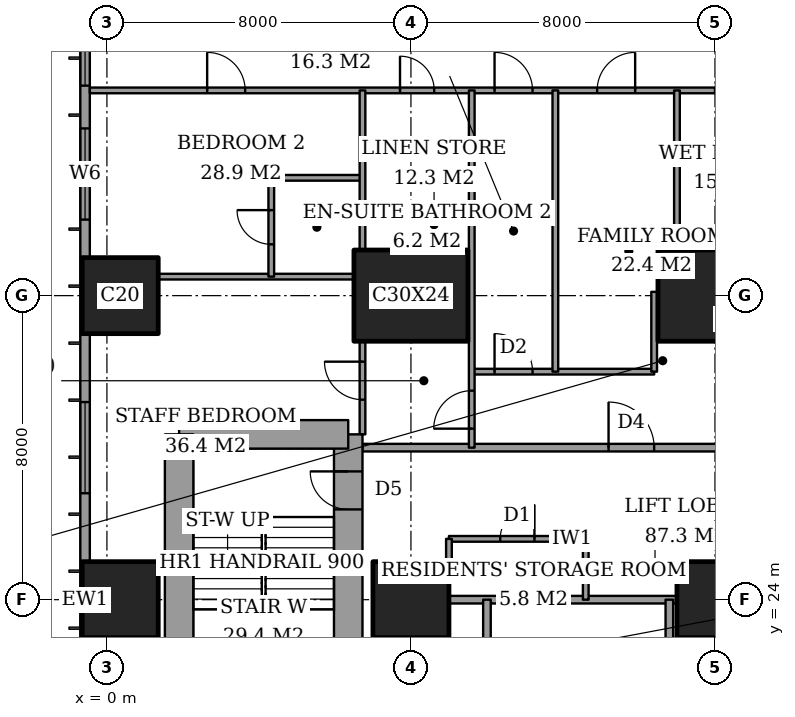
"""IFC4 building model, lengths in metres.
Left out: names, types, materials, properties, quantities, classifications, styles, units other than length and angle.
Written with IfcOpenShell. Run it as: python <this file> out.ifc"""

import sys

from ifc_helpers import new_model, si_unit, direction, frame, frame_2d, origin, origin_2d, place, context, subcontext, project, spatial, rectangle, extrude, element, fill, save


model = new_model("IFC4")
c1 = context("Model", 3, precision=1e-05, world=origin(), true_north=direction((0.0, 1.0)))
c2 = subcontext(c1, "Body", "Model", "MODEL_VIEW")
j1 = project(units=[si_unit("LENGTHUNIT", "METRE"), si_unit("PLANEANGLEUNIT", "RADIAN")], contexts=[c1])
p1 = place(None, origin())
s1 = spatial("IfcSite", under=j1, at=p1, CompositionType="ELEMENT")
p2 = place(p1, origin())
s2 = spatial("IfcBuilding", under=s1, at=p2, CompositionType="ELEMENT")
p3 = place(p2, frame((0.0, 0.0, 36.8)))
s3 = spatial("IfcBuildingStorey", under=s2, at=p3, CompositionType="ELEMENT", Elevation=36.8)
for number, where, z_axis, x_axis in (
    (1, (0.35, 24.0, 0.0), (0.0, 0.0, 1.0), (1.0, 0.0, 0.0)),
    (2, (0.35, 32.0, 0.0), (0.0, 0.0, 1.0), (1.0, 0.0, 0.0)),
    (3, (8.0, 24.0, 0.0), (0.0, 0.0, 1.0), (1.0, 0.0, 0.0)),
):
    element("IfcColumn", number, at=place(p3, frame(where, z_axis=z_axis, x_axis=x_axis)), inside=s3, PredefinedType="COLUMN", context=c2, shape_type="SweptSolid", body=[
        extrude(rectangle(XDim=2.0, YDim=2.0, at=origin_2d()), origin(), (0.0, 0.0, 1.0), 3.6),
    ])
p4 = place(p3, frame((8.0, 32.0, 0.0), z_axis=(0.0, 0.0, 1.0), x_axis=(1.0, 0.0, 0.0)))
e4 = element("IfcColumn", 4, at=p4, inside=s3, PredefinedType="COLUMN", context=c2, shape_type="SweptSolid", body=[
    extrude(rectangle(XDim=3.0, YDim=2.4, at=origin_2d()), origin(), (0.0, 0.0, 1.0), 3.6),
])
p5 = place(p3, frame((16.0, 24.0, 0.0), z_axis=(0.0, 0.0, 1.0), x_axis=(1.0, 0.0, 0.0)))
e5 = element("IfcColumn", 5, at=p5, inside=s3, PredefinedType="COLUMN", context=c2, shape_type="SweptSolid", body=[
    extrude(rectangle(XDim=2.0, YDim=2.0, at=origin_2d()), origin(), (0.0, 0.0, 1.0), 3.6),
])
p6 = place(p3, frame((16.0, 32.0, 0.0), z_axis=(0.0, 0.0, 1.0), x_axis=(1.0, 0.0, 0.0)))
e6 = element("IfcColumn", 6, at=p6, inside=s3, PredefinedType="COLUMN", context=c2, shape_type="SweptSolid", body=[
    extrude(rectangle(XDim=3.0, YDim=2.4, at=origin_2d()), origin(), (0.0, 0.0, 1.0), 3.6),
])
p7 = place(p3, frame((6.35, 19.65, 0.0), z_axis=(0.0, 0.0, 1.0), x_axis=(0.0, 1.0, 0.0)))
e7 = element("IfcWall", 7, at=p7, inside=s3, PredefinedType="SHEAR", context=c2, shape_type="SweptSolid", body=[
    extrude(rectangle(XDim=8.7, YDim=0.75, at=frame_2d((4.35, 0.0))), origin(), (0.0, 0.0, 1.0), 3.6),
])
p8 = place(p7, frame((6.725, 0.0, 0.0)))
e8 = element("IfcOpeningElement", 8, at=p8, cuts=e7, PredefinedType="OPENING", context=c2, shape_type="SweptSolid", body=[
    extrude(rectangle(XDim=1.0, YDim=2.1, at=frame_2d((0.5, 1.05))), frame((0.0, 0.385, 0.0), z_axis=(0.0, -1.0, 0.0), x_axis=(1.0, 0.0, 0.0)), (0.0, 0.0, 1.0), 0.77),
])
p9 = place(p3, frame((6.35, 28.35, 0.0), z_axis=(0.0, 0.0, 1.0), x_axis=(-1.0, 0.0, 0.0)))
e9 = element("IfcWall", 9, at=p9, inside=s3, PredefinedType="SHEAR", context=c2, shape_type="SweptSolid", body=[
    extrude(rectangle(XDim=4.45, YDim=0.75, at=frame_2d((2.225, 0.0))), origin(), (0.0, 0.0, 1.0), 3.6),
])
p10 = place(p3, frame((1.9, 28.35, 0.0), z_axis=(0.0, 0.0, 1.0), x_axis=(0.0, -1.0, 0.0)))
e10 = element("IfcWall", 10, at=p10, inside=s3, PredefinedType="SHEAR", context=c2, shape_type="SweptSolid", body=[
    extrude(rectangle(XDim=8.7, YDim=0.75, at=frame_2d((4.35, 0.0))), origin(), (0.0, 0.0, 1.0), 3.6),
])
p11 = place(p3, frame((-0.575, 44.825, 0.0), z_axis=(0.0, 0.0, 1.0), x_axis=(0.0, -1.0, 0.0)))
e11 = element("IfcWall", 11, at=p11, inside=s3, PredefinedType="SOLIDWALL", context=c2, shape_type="SweptSolid", body=[
    extrude(rectangle(XDim=41.65, YDim=0.25, at=frame_2d((20.825, 0.0))), origin(), (0.0, 0.0, 1.0), 3.6),
])
p12 = place(p11, frame((0.775, 0.0, 0.6)))
e12 = element("IfcOpeningElement", 12, at=p12, cuts=e11, PredefinedType="OPENING", context=c2, shape_type="SweptSolid", body=[
    extrude(rectangle(XDim=2.4, YDim=2.0, at=frame_2d((1.2, 1.0))), frame((0.0, 0.135, 0.0), z_axis=(0.0, -1.0, 0.0), x_axis=(1.0, 0.0, 0.0)), (0.0, 0.0, 1.0), 0.27),
])
p13 = place(p11, frame((6.1, 0.0, 0.6)))
e13 = element("IfcOpeningElement", 13, at=p13, cuts=e11, PredefinedType="OPENING", context=c2, shape_type="SweptSolid", body=[
    extrude(rectangle(XDim=1.2, YDim=2.0, at=frame_2d((0.6, 1.0))), frame((0.0, 0.135, 0.0), z_axis=(0.0, -1.0, 0.0), x_axis=(1.0, 0.0, 0.0)), (0.0, 0.0, 1.0), 0.27),
])
p14 = place(p11, frame((8.425, 0.0, 0.6)))
e14 = element("IfcOpeningElement", 14, at=p14, cuts=e11, PredefinedType="OPENING", context=c2, shape_type="SweptSolid", body=[
    extrude(rectangle(XDim=2.4, YDim=2.0, at=frame_2d((1.2, 1.0))), frame((0.0, 0.135, 0.0), z_axis=(0.0, -1.0, 0.0), x_axis=(1.0, 0.0, 0.0)), (0.0, 0.0, 1.0), 0.27),
])
p15 = place(p11, frame((15.625, 0.0, 0.6)))
e15 = element("IfcOpeningElement", 15, at=p15, cuts=e11, PredefinedType="OPENING", context=c2, shape_type="SweptSolid", body=[
    extrude(rectangle(XDim=2.4, YDim=2.0, at=frame_2d((1.2, 1.0))), frame((0.0, 0.135, 0.0), z_axis=(0.0, -1.0, 0.0), x_axis=(1.0, 0.0, 0.0)), (0.0, 0.0, 1.0), 0.27),
])
p16 = place(p11, frame((23.625, 0.0, 0.6)))
e16 = element("IfcOpeningElement", 16, at=p16, cuts=e11, PredefinedType="OPENING", context=c2, shape_type="SweptSolid", body=[
    extrude(rectangle(XDim=2.4, YDim=2.0, at=frame_2d((1.2, 1.0))), frame((0.0, 0.135, 0.0), z_axis=(0.0, -1.0, 0.0), x_axis=(1.0, 0.0, 0.0)), (0.0, 0.0, 1.0), 0.27),
])
p17 = place(p11, frame((30.825, 0.0, 0.6)))
e17 = element("IfcOpeningElement", 17, at=p17, cuts=e11, PredefinedType="OPENING", context=c2, shape_type="SweptSolid", body=[
    extrude(rectangle(XDim=2.4, YDim=2.0, at=frame_2d((1.2, 1.0))), frame((0.0, 0.135, 0.0), z_axis=(0.0, -1.0, 0.0), x_axis=(1.0, 0.0, 0.0)), (0.0, 0.0, 1.0), 0.27),
])
p18 = place(p11, frame((34.5, 0.0, 0.6)))
e18 = element("IfcOpeningElement", 18, at=p18, cuts=e11, PredefinedType="OPENING", context=c2, shape_type="SweptSolid", body=[
    extrude(rectangle(XDim=1.2, YDim=2.0, at=frame_2d((0.6, 1.0))), frame((0.0, 0.135, 0.0), z_axis=(0.0, -1.0, 0.0), x_axis=(1.0, 0.0, 0.0)), (0.0, 0.0, 1.0), 0.27),
])
p19 = place(p11, frame((38.475, 0.0, 0.6)))
e19 = element("IfcOpeningElement", 19, at=p19, cuts=e11, PredefinedType="OPENING", context=c2, shape_type="SweptSolid", body=[
    extrude(rectangle(XDim=2.4, YDim=2.0, at=frame_2d((1.2, 1.0))), frame((0.0, 0.135, 0.0), z_axis=(0.0, -1.0, 0.0), x_axis=(1.0, 0.0, 0.0)), (0.0, 0.0, 1.0), 0.27),
])
p20 = place(p3, frame((9.0, 24.0, 0.0), z_axis=(0.0, 0.0, 1.0), x_axis=(1.0, 0.0, 0.0)))
e20 = element("IfcWall", 20, at=p20, inside=s3, PredefinedType="PARTITIONING", context=c2, shape_type="SweptSolid", body=[
    extrude(rectangle(XDim=6.0, YDim=0.2, at=frame_2d((3.0, 0.0))), origin(), (0.0, 0.0, 1.0), 3.35),
])
p21 = place(p3, frame((9.0, 25.6, 0.0), z_axis=(0.0, 0.0, 1.0), x_axis=(1.0, 0.0, 0.0)))
e21 = element("IfcWall", 21, at=p21, inside=s3, PredefinedType="PARTITIONING", context=c2, shape_type="SweptSolid", body=[
    extrude(rectangle(XDim=3.6, YDim=0.15, at=frame_2d((1.8, 0.0))), origin(), (0.0, 0.0, 1.0), 3.35),
])
p22 = place(p21, frame((1.35, 0.0, 0.0)))
e22 = element("IfcOpeningElement", 22, at=p22, cuts=e21, PredefinedType="OPENING", context=c2, shape_type="SweptSolid", body=[
    extrude(rectangle(XDim=0.9, YDim=2.1, at=frame_2d((0.45, 1.05))), frame((0.0, 0.085, 0.0), z_axis=(0.0, -1.0, 0.0), x_axis=(1.0, 0.0, 0.0)), (0.0, 0.0, 1.0), 0.17),
])
p23 = place(p3, frame((6.725, 28.0, 0.0), z_axis=(0.0, 0.0, 1.0), x_axis=(1.0, 0.0, 0.0)))
e23 = element("IfcWall", 23, at=p23, inside=s3, PredefinedType="PARTITIONING", context=c2, shape_type="SweptSolid", body=[
    extrude(rectangle(XDim=17.275, YDim=0.2, at=frame_2d((8.637, 0.0))), origin(), (0.0, 0.0, 1.0), 3.35),
])
p24 = place(p23, frame((6.475, 0.0, 0.0)))
e24 = element("IfcOpeningElement", 24, at=p24, cuts=e23, PredefinedType="OPENING", context=c2, shape_type="SweptSolid", body=[
    extrude(rectangle(XDim=1.2, YDim=2.4, at=frame_2d((0.6, 1.2))), frame((0.0, 0.11, 0.0), z_axis=(0.0, -1.0, 0.0), x_axis=(1.0, 0.0, 0.0)), (0.0, 0.0, 1.0), 0.22),
])
p25 = place(p3, frame((9.6, 30.0, 0.0), z_axis=(0.0, 0.0, 1.0), x_axis=(1.0, 0.0, 0.0)))
e25 = element("IfcWall", 25, at=p25, inside=s3, PredefinedType="PARTITIONING", context=c2, shape_type="SweptSolid", body=[
    extrude(rectangle(XDim=4.8, YDim=0.15, at=frame_2d((2.4, 0.0))), origin(), (0.0, 0.0, 1.0), 3.35),
])
p26 = place(p25, frame((0.6, 0.0, 0.0)))
e26 = element("IfcOpeningElement", 26, at=p26, cuts=e25, PredefinedType="OPENING", context=c2, shape_type="SweptSolid", body=[
    extrude(rectangle(XDim=1.0, YDim=2.1, at=frame_2d((0.5, 1.05))), frame((0.0, 0.085, 0.0), z_axis=(0.0, -1.0, 0.0), x_axis=(1.0, 0.0, 0.0)), (0.0, 0.0, 1.0), 0.17),
])
p27 = place(p3, frame((1.35, 32.5, 0.0), z_axis=(0.0, 0.0, 1.0), x_axis=(1.0, 0.0, 0.0)))
e27 = element("IfcWall", 27, at=p27, inside=s3, PredefinedType="PARTITIONING", context=c2, shape_type="SweptSolid", body=[
    extrude(rectangle(XDim=5.15, YDim=0.15, at=frame_2d((2.575, 0.0))), origin(), (0.0, 0.0, 1.0), 3.35),
])
p28 = place(p3, frame((4.325, 35.1, 0.0), z_axis=(0.0, 0.0, 1.0), x_axis=(1.0, 0.0, 0.0)))
e28 = element("IfcWall", 28, at=p28, inside=s3, PredefinedType="PARTITIONING", context=c2, shape_type="SweptSolid", body=[
    extrude(rectangle(XDim=2.4, YDim=0.15, at=frame_2d((1.2, 0.0))), origin(), (0.0, 0.0, 1.0), 3.35),
])
p29 = place(p3, frame((-0.45, 37.4, 0.0), z_axis=(0.0, 0.0, 1.0), x_axis=(1.0, 0.0, 0.0)))
e29 = element("IfcWall", 29, at=p29, inside=s3, PredefinedType="PARTITIONING", context=c2, shape_type="SweptSolid", body=[
    extrude(rectangle(XDim=25.011, YDim=0.15, at=frame_2d((12.505, 0.0))), origin(), (0.0, 0.0, 1.0), 3.35),
])
p30 = place(p29, frame((10.65, 0.0, 0.0)))
e30 = element("IfcOpeningElement", 30, at=p30, cuts=e29, PredefinedType="OPENING", context=c2, shape_type="SweptSolid", body=[
    extrude(rectangle(XDim=1.0, YDim=2.1, at=frame_2d((0.5, 1.05))), frame((0.0, 0.085, 0.0), z_axis=(0.0, -1.0, 0.0), x_axis=(1.0, 0.0, 0.0)), (0.0, 0.0, 1.0), 0.17),
])
p31 = place(p29, frame((3.087, 0.0, 0.0)))
e31 = element("IfcOpeningElement", 31, at=p31, cuts=e29, PredefinedType="OPENING", context=c2, shape_type="SweptSolid", body=[
    extrude(rectangle(XDim=1.0, YDim=2.1, at=frame_2d((0.5, 1.05))), frame((0.0, 0.085, 0.0), z_axis=(0.0, -1.0, 0.0), x_axis=(1.0, 0.0, 0.0)), (0.0, 0.0, 1.0), 0.17),
])
p32 = place(p29, frame((8.163, 0.0, 0.0)))
e32 = element("IfcOpeningElement", 32, at=p32, cuts=e29, PredefinedType="OPENING", context=c2, shape_type="SweptSolid", body=[
    extrude(rectangle(XDim=0.9, YDim=2.1, at=frame_2d((0.45, 1.05))), frame((0.0, 0.085, 0.0), z_axis=(0.0, -1.0, 0.0), x_axis=(1.0, 0.0, 0.0)), (0.0, 0.0, 1.0), 0.17),
])
p33 = place(p29, frame((13.35, 0.0, 0.0)))
e33 = element("IfcOpeningElement", 33, at=p33, cuts=e29, PredefinedType="OPENING", context=c2, shape_type="SweptSolid", body=[
    extrude(rectangle(XDim=1.0, YDim=2.1, at=frame_2d((0.5, 1.05))), frame((0.0, 0.085, 0.0), z_axis=(0.0, -1.0, 0.0), x_axis=(1.0, 0.0, 0.0)), (0.0, 0.0, 1.0), 0.17),
])
p34 = place(p29, frame((16.45, 0.0, 0.0)))
e34 = element("IfcOpeningElement", 34, at=p34, cuts=e29, PredefinedType="OPENING", context=c2, shape_type="SweptSolid", body=[
    extrude(rectangle(XDim=1.0, YDim=2.1, at=frame_2d((0.5, 1.05))), frame((0.0, 0.085, 0.0), z_axis=(0.0, -1.0, 0.0), x_axis=(1.0, 0.0, 0.0)), (0.0, 0.0, 1.0), 0.17),
])
p35 = place(p29, frame((21.175, 0.0, 0.0)))
e35 = element("IfcOpeningElement", 35, at=p35, cuts=e29, PredefinedType="OPENING", context=c2, shape_type="SweptSolid", body=[
    extrude(rectangle(XDim=1.0, YDim=2.1, at=frame_2d((0.5, 1.05))), frame((0.0, 0.085, 0.0), z_axis=(0.0, -1.0, 0.0), x_axis=(1.0, 0.0, 0.0)), (0.0, 0.0, 1.0), 0.17),
])
p36 = place(p3, frame((4.325, 32.5, 0.0), z_axis=(0.0, 0.0, 1.0), x_axis=(0.0, 1.0, 0.0)))
e36 = element("IfcWall", 36, at=p36, inside=s3, PredefinedType="PARTITIONING", context=c2, shape_type="SweptSolid", body=[
    extrude(rectangle(XDim=2.6, YDim=0.15, at=frame_2d((1.3, 0.0))), origin(), (0.0, 0.0, 1.0), 3.35),
])
p37 = place(p36, frame((0.85, 0.0, 0.0)))
e37 = element("IfcOpeningElement", 37, at=p37, cuts=e36, PredefinedType="OPENING", context=c2, shape_type="SweptSolid", body=[
    extrude(rectangle(XDim=0.9, YDim=2.1, at=frame_2d((0.45, 1.05))), frame((0.0, 0.085, 0.0), z_axis=(0.0, -1.0, 0.0), x_axis=(1.0, 0.0, 0.0)), (0.0, 0.0, 1.0), 0.17),
])
p38 = place(p3, frame((6.725, 28.35, 0.0), z_axis=(0.0, 0.0, 1.0), x_axis=(0.0, 1.0, 0.0)))
e38 = element("IfcWall", 38, at=p38, inside=s3, PredefinedType="PARTITIONING", context=c2, shape_type="SweptSolid", body=[
    extrude(rectangle(XDim=2.45, YDim=0.15, at=frame_2d((1.225, 0.0))), origin(), (0.0, 0.0, 1.0), 3.35),
])
p39 = place(p38, frame((0.913, 0.0, 0.0)))
e39 = element("IfcOpeningElement", 39, at=p39, cuts=e38, PredefinedType="OPENING", context=c2, shape_type="SweptSolid", body=[
    extrude(rectangle(XDim=1.0, YDim=2.1, at=frame_2d((0.5, 1.05))), frame((0.0, 0.085, 0.0), z_axis=(0.0, -1.0, 0.0), x_axis=(1.0, 0.0, 0.0)), (0.0, 0.0, 1.0), 0.17),
])
p40 = place(p3, frame((6.725, 33.2, 0.0), z_axis=(0.0, 0.0, 1.0), x_axis=(0.0, 1.0, 0.0)))
e40 = element("IfcWall", 40, at=p40, inside=s3, PredefinedType="PARTITIONING", context=c2, shape_type="SweptSolid", body=[
    extrude(rectangle(XDim=4.2, YDim=0.15, at=frame_2d((2.1, 0.0))), origin(), (0.0, 0.0, 1.0), 3.35),
])
p41 = place(p3, frame((9.0, 25.0, 0.0), z_axis=(0.0, 0.0, 1.0), x_axis=(0.0, 1.0, 0.0)))
e41 = element("IfcWall", 41, at=p41, inside=s3, PredefinedType="PARTITIONING", context=c2, shape_type="SweptSolid", body=[
    extrude(rectangle(XDim=0.6, YDim=0.15, at=frame_2d((0.3, 0.0))), origin(), (0.0, 0.0, 1.0), 3.35),
])
p42 = place(p3, frame((9.6, 28.0, 0.0), z_axis=(0.0, 0.0, 1.0), x_axis=(0.0, 1.0, 0.0)))
e42 = element("IfcWall", 42, at=p42, inside=s3, PredefinedType="PARTITIONING", context=c2, shape_type="SweptSolid", body=[
    extrude(rectangle(XDim=9.4, YDim=0.15, at=frame_2d((4.7, 0.0))), origin(), (0.0, 0.0, 1.0), 3.35),
])
p43 = place(p42, frame((0.5, 0.0, 0.0)))
e43 = element("IfcOpeningElement", 43, at=p43, cuts=e42, PredefinedType="OPENING", context=c2, shape_type="SweptSolid", body=[
    extrude(rectangle(XDim=1.0, YDim=2.1, at=frame_2d((0.5, 1.05))), frame((0.0, 0.085, 0.0), z_axis=(0.0, -1.0, 0.0), x_axis=(1.0, 0.0, 0.0)), (0.0, 0.0, 1.0), 0.17),
])
p44 = place(p3, frame((10.0, 21.6, 0.0), z_axis=(0.0, 0.0, 1.0), x_axis=(0.0, 1.0, 0.0)))
e44 = element("IfcWall", 44, at=p44, inside=s3, PredefinedType="PARTITIONING", context=c2, shape_type="SweptSolid", body=[
    extrude(rectangle(XDim=2.4, YDim=0.2, at=frame_2d((1.2, 0.0))), origin(), (0.0, 0.0, 1.0), 3.35),
])
p45 = place(p3, frame((11.8, 30.0, 0.0), z_axis=(0.0, 0.0, 1.0), x_axis=(0.0, 1.0, 0.0)))
e45 = element("IfcWall", 45, at=p45, inside=s3, PredefinedType="PARTITIONING", context=c2, shape_type="SweptSolid", body=[
    extrude(rectangle(XDim=7.4, YDim=0.15, at=frame_2d((3.7, 0.0))), origin(), (0.0, 0.0, 1.0), 3.35),
])
p46 = place(p3, frame((12.6, 24.0, 0.0), z_axis=(0.0, 0.0, 1.0), x_axis=(0.0, 1.0, 0.0)))
e46 = element("IfcWall", 46, at=p46, inside=s3, PredefinedType="PARTITIONING", context=c2, shape_type="SweptSolid", body=[
    extrude(rectangle(XDim=1.6, YDim=0.15, at=frame_2d((0.8, 0.0))), origin(), (0.0, 0.0, 1.0), 3.35),
])
p47 = place(p3, frame((14.4, 30.0, 0.0), z_axis=(0.0, 0.0, 1.0), x_axis=(0.0, 1.0, 0.0)))
e47 = element("IfcWall", 47, at=p47, inside=s3, PredefinedType="PARTITIONING", context=c2, shape_type="SweptSolid", body=[
    extrude(rectangle(XDim=2.1, YDim=0.15, at=frame_2d((1.05, 0.0))), origin(), (0.0, 0.0, 1.0), 3.35),
])
p48 = place(p3, frame((14.8, 21.6, 0.0), z_axis=(0.0, 0.0, 1.0), x_axis=(0.0, 1.0, 0.0)))
e48 = element("IfcWall", 48, at=p48, inside=s3, PredefinedType="PARTITIONING", context=c2, shape_type="SweptSolid", body=[
    extrude(rectangle(XDim=2.4, YDim=0.2, at=frame_2d((1.2, 0.0))), origin(), (0.0, 0.0, 1.0), 3.35),
])
p49 = place(p3, frame((15.0, 33.2, 0.0), z_axis=(0.0, 0.0, 1.0), x_axis=(0.0, 1.0, 0.0)))
e49 = element("IfcWall", 49, at=p49, inside=s3, PredefinedType="PARTITIONING", context=c2, shape_type="SweptSolid", body=[
    extrude(rectangle(XDim=4.2, YDim=0.15, at=frame_2d((2.1, 0.0))), origin(), (0.0, 0.0, 1.0), 3.35),
])
p50 = place(p13, origin())
e50 = element("IfcWindow", 50, at=p50, inside=s3, PartitioningType="SINGLE_PANEL", PredefinedType="WINDOW", context=c2, shape_type="SweptSolid", body=[
    extrude(rectangle(XDim=1.2, YDim=2.0, at=frame_2d((0.6, 1.0))), frame((0.0, 0.03, 0.0), z_axis=(0.0, -1.0, 0.0), x_axis=(1.0, 0.0, 0.0)), (0.0, 0.0, 1.0), 0.06),
])
fill(e13, e50)
p51 = place(p14, origin())
e51 = element("IfcWindow", 51, at=p51, inside=s3, PartitioningType="SINGLE_PANEL", PredefinedType="WINDOW", context=c2, shape_type="SweptSolid", body=[
    extrude(rectangle(XDim=2.4, YDim=2.0, at=frame_2d((1.2, 1.0))), frame((0.0, 0.03, 0.0), z_axis=(0.0, -1.0, 0.0), x_axis=(1.0, 0.0, 0.0)), (0.0, 0.0, 1.0), 0.06),
])
fill(e14, e51)
p52 = place(p15, origin())
e52 = element("IfcWindow", 52, at=p52, inside=s3, PartitioningType="SINGLE_PANEL", PredefinedType="WINDOW", context=c2, shape_type="SweptSolid", body=[
    extrude(rectangle(XDim=2.4, YDim=2.0, at=frame_2d((1.2, 1.0))), frame((0.0, 0.03, 0.0), z_axis=(0.0, -1.0, 0.0), x_axis=(1.0, 0.0, 0.0)), (0.0, 0.0, 1.0), 0.06),
])
fill(e15, e52)
p53 = place(p30, origin())
e53 = element("IfcDoor", 53, at=p53, inside=s3, OperationType="SINGLE_SWING_RIGHT", PredefinedType="DOOR", context=c2, shape_type="SweptSolid", body=[
    extrude(rectangle(XDim=1.0, YDim=2.1, at=frame_2d((0.5, 1.05))), frame((0.0, 0.025, 0.0), z_axis=(0.0, -1.0, 0.0), x_axis=(1.0, 0.0, 0.0)), (0.0, 0.0, 1.0), 0.05),
])
fill(e30, e53)
p54 = place(p37, origin())
e54 = element("IfcDoor", 54, at=p54, inside=s3, OperationType="SINGLE_SWING_LEFT", PredefinedType="DOOR", context=c2, shape_type="SweptSolid", body=[
    extrude(rectangle(XDim=0.9, YDim=2.1, at=frame_2d((0.45, 1.05))), frame((0.0, 0.025, 0.0), z_axis=(0.0, -1.0, 0.0), x_axis=(1.0, 0.0, 0.0)), (0.0, 0.0, 1.0), 0.05),
])
fill(e37, e54)
p55 = place(p31, origin())
e55 = element("IfcDoor", 55, at=p55, inside=s3, OperationType="SINGLE_SWING_RIGHT", PredefinedType="DOOR", context=c2, shape_type="SweptSolid", body=[
    extrude(rectangle(XDim=1.0, YDim=2.1, at=frame_2d((0.5, 1.05))), frame((0.0, 0.025, 0.0), z_axis=(0.0, -1.0, 0.0), x_axis=(1.0, 0.0, 0.0)), (0.0, 0.0, 1.0), 0.05),
])
fill(e31, e55)
p56 = place(p39, origin())
e56 = element("IfcDoor", 56, at=p56, inside=s3, OperationType="SINGLE_SWING_LEFT", PredefinedType="DOOR", context=c2, shape_type="SweptSolid", body=[
    extrude(rectangle(XDim=1.0, YDim=2.1, at=frame_2d((0.5, 1.05))), frame((0.0, 0.025, 0.0), z_axis=(0.0, -1.0, 0.0), x_axis=(1.0, 0.0, 0.0)), (0.0, 0.0, 1.0), 0.05),
])
fill(e39, e56)
p57 = place(p32, origin())
e57 = element("IfcDoor", 57, at=p57, inside=s3, OperationType="SINGLE_SWING_RIGHT", PredefinedType="DOOR", context=c2, shape_type="SweptSolid", body=[
    extrude(rectangle(XDim=0.9, YDim=2.1, at=frame_2d((0.45, 1.05))), frame((0.0, 0.025, 0.0), z_axis=(0.0, -1.0, 0.0), x_axis=(1.0, 0.0, 0.0)), (0.0, 0.0, 1.0), 0.05),
])
fill(e32, e57)
p58 = place(p43, origin())
e58 = element("IfcDoor", 58, at=p58, inside=s3, OperationType="SINGLE_SWING_RIGHT", PredefinedType="DOOR", context=c2, shape_type="SweptSolid", body=[
    extrude(rectangle(XDim=1.0, YDim=2.1, at=frame_2d((0.5, 1.05))), frame((0.0, 0.025, 0.0), z_axis=(0.0, -1.0, 0.0), x_axis=(1.0, 0.0, 0.0)), (0.0, 0.0, 1.0), 0.05),
])
fill(e43, e58)
p59 = place(p24, origin())
e59 = element("IfcDoor", 59, at=p59, inside=s3, OperationType="SINGLE_SWING_RIGHT", PredefinedType="DOOR", context=c2, shape_type="SweptSolid", body=[
    extrude(rectangle(XDim=1.2, YDim=2.4, at=frame_2d((0.6, 1.2))), frame((0.0, 0.025, 0.0), z_axis=(0.0, -1.0, 0.0), x_axis=(1.0, 0.0, 0.0)), (0.0, 0.0, 1.0), 0.05),
])
fill(e24, e59)
p60 = place(p26, origin())
e60 = element("IfcDoor", 60, at=p60, inside=s3, OperationType="SINGLE_SWING_RIGHT", PredefinedType="DOOR", context=c2, shape_type="SweptSolid", body=[
    extrude(rectangle(XDim=1.0, YDim=2.1, at=frame_2d((0.5, 1.05))), frame((0.0, 0.025, 0.0), z_axis=(0.0, -1.0, 0.0), x_axis=(1.0, 0.0, 0.0)), (0.0, 0.0, 1.0), 0.05),
])
fill(e26, e60)
p61 = place(p33, origin())
e61 = element("IfcDoor", 61, at=p61, inside=s3, OperationType="SINGLE_SWING_LEFT", PredefinedType="DOOR", context=c2, shape_type="SweptSolid", body=[
    extrude(rectangle(XDim=1.0, YDim=2.1, at=frame_2d((0.5, 1.05))), frame((0.0, 0.025, 0.0), z_axis=(0.0, -1.0, 0.0), x_axis=(1.0, 0.0, 0.0)), (0.0, 0.0, 1.0), 0.05),
])
fill(e33, e61)
p62 = place(p22, origin())
e62 = element("IfcDoor", 62, at=p62, inside=s3, OperationType="SINGLE_SWING_LEFT", PredefinedType="DOOR", context=c2, shape_type="SweptSolid", body=[
    extrude(rectangle(XDim=0.9, YDim=2.1, at=frame_2d((0.45, 1.05))), frame((0.0, 0.025, 0.0), z_axis=(0.0, -1.0, 0.0), x_axis=(1.0, 0.0, 0.0)), (0.0, 0.0, 1.0), 0.05),
])
fill(e22, e62)
p63 = place(p8, origin())
e63 = element("IfcDoor", 63, at=p63, inside=s3, OperationType="SINGLE_SWING_LEFT", PredefinedType="DOOR", context=c2, shape_type="SweptSolid", body=[
    extrude(rectangle(XDim=1.0, YDim=2.1, at=frame_2d((0.5, 1.05))), frame((0.0, 0.025, 0.0), z_axis=(0.0, -1.0, 0.0), x_axis=(1.0, 0.0, 0.0)), (0.0, 0.0, 1.0), 0.05),
])
fill(e8, e63)
save(model, sys.argv[1])
